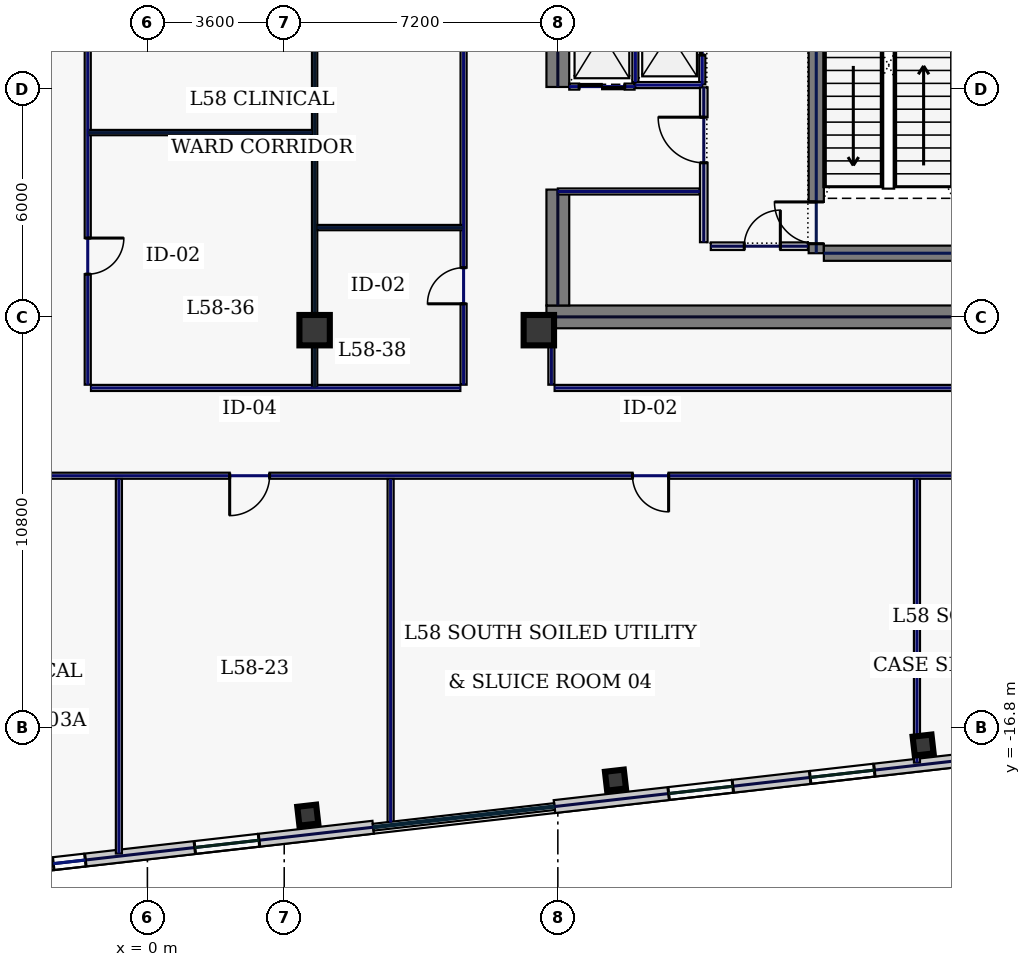
"""IFC4 building model, lengths in metres.
Left out: names, types, materials, properties, quantities, classifications, styles, units other than length and angle.
Written with IfcOpenShell. Run it as: python <this file> out.ifc"""

import sys

from ifc_helpers import new_model, si_unit, direction, frame, frame_2d, origin, origin_2d, place, context, subcontext, project, spatial, rectangle, hollow_rectangle, extrude, element, fill, save


model = new_model("IFC4")
c1 = context("Model", 3, precision=1e-05, world=origin(), true_north=direction((0.0, 1.0)))
c2 = subcontext(c1, "Body", "Model", "MODEL_VIEW")
j1 = project(units=[si_unit("LENGTHUNIT", "METRE"), si_unit("PLANEANGLEUNIT", "RADIAN")], contexts=[c1])
p1 = place(None, origin())
s1 = spatial("IfcSite", under=j1, at=p1, CompositionType="ELEMENT")
p2 = place(p1, origin())
s2 = spatial("IfcBuilding", under=s1, at=p2, CompositionType="ELEMENT")
p3 = place(p2, frame((0.0, 0.0, 251.0)))
s3 = spatial("IfcBuildingStorey", under=s2, at=p3, CompositionType="ELEMENT", Elevation=251.0)
p4 = place(p3, frame((10.5, -6.0, 0.0), z_axis=(0.0, 0.0, 1.0), x_axis=(1.0, 0.0, 0.0)))
e1 = element("IfcWall", 1, at=p4, inside=s3, PredefinedType="SHEAR", context=c2, shape_type="SweptSolid", body=[
    extrude(rectangle(XDim=11.5, YDim=0.6, at=frame_2d((5.75, 0.0))), origin(), (0.0, 0.0, 1.0), 3.74),
])
p5 = place(p3, frame((10.8, -5.7, 0.0), z_axis=(0.0, 0.0, 1.0), x_axis=(0.0, 1.0, 0.0)))
e2 = element("IfcWall", 2, at=p5, inside=s3, PredefinedType="SHEAR", context=c2, shape_type="SweptSolid", body=[
    extrude(rectangle(XDim=3.05, YDim=0.6, at=frame_2d((1.525, 0.0))), origin(), (0.0, 0.0, 1.0), 3.74),
])
p6 = place(p3, frame((10.8, 0.05, 0.0), z_axis=(0.0, 0.0, 1.0), x_axis=(0.0, 1.0, 0.0)))
e3 = element("IfcWall", 3, at=p6, inside=s3, PredefinedType="SHEAR", context=c2, shape_type="SweptSolid", body=[
    extrude(rectangle(XDim=5.65, YDim=0.6, at=frame_2d((2.825, 0.0))), origin(), (0.0, 0.0, 1.0), 3.74),
])
p7 = place(p3, frame((17.6, -4.325, 0.0), z_axis=(0.0, 0.0, 1.0), x_axis=(0.0, 1.0, 0.0)))
e4 = element("IfcWall", 4, at=p7, inside=s3, PredefinedType="SHEAR", context=c2, shape_type="SweptSolid", body=[
    extrude(rectangle(XDim=8.65, YDim=0.4, at=frame_2d((4.325, 0.0))), origin(), (0.0, 0.0, 1.0), 3.74),
])
p8 = place(p7, frame((0.25, 0.0, 0.0)))
e5 = element("IfcOpeningElement", 5, at=p8, cuts=e4, PredefinedType="OPENING", context=c2, shape_type="SweptSolid", body=[
    extrude(rectangle(XDim=1.1, YDim=2.2, at=frame_2d((0.55, 1.1))), frame((0.0, 0.21, 0.0), z_axis=(0.0, -1.0, 0.0), x_axis=(1.0, 0.0, 0.0)), (0.0, 0.0, 1.0), 0.42),
])
p9 = place(p3, frame((17.8, -4.325, 0.0), z_axis=(0.0, 0.0, 1.0), x_axis=(1.0, 0.0, 0.0)))
e6 = element("IfcWall", 6, at=p9, inside=s3, PredefinedType="SHEAR", context=c2, shape_type="SweptSolid", body=[
    extrude(rectangle(XDim=3.4, YDim=0.4, at=frame_2d((1.7, 0.0))), origin(), (0.0, 0.0, 1.0), 3.74),
])
for number, where, z_axis, x_axis in (
    (7, (10.3, -6.35, 0.0), (0.0, 0.0, 1.0), (1.0, 0.0, 0.0)),
    (8, (4.4, -6.35, 0.0), (0.0, 0.0, 1.0), (1.0, 0.0, 0.0)),
):
    element("IfcColumn", number, at=place(p3, frame(where, z_axis=z_axis, x_axis=x_axis)), inside=s3, PredefinedType="COLUMN", context=c2, shape_type="SweptSolid", body=[
        extrude(hollow_rectangle(XDim=0.8, YDim=0.8, WallThickness=0.036, at=origin_2d()), origin(), (0.0, 0.0, 1.0), 3.74),
    ])
for number, where, z_axis, x_axis in (
    (9, (4.22, -19.113, 0.0), (0.0, 0.0, 1.0), (0.994, 0.113, 0.0)),
    (10, (12.316, -18.19, 0.0), (0.0, 0.0, 1.0), (0.994, 0.113, 0.0)),
    (11, (20.412, -17.268, 0.0), (0.0, 0.0, 1.0), (0.994, 0.113, 0.0)),
):
    element("IfcColumn", number, at=place(p3, frame(where, z_axis=z_axis, x_axis=x_axis)), inside=s3, PredefinedType="COLUMN", context=c2, shape_type="SweptSolid", body=[
        extrude(hollow_rectangle(XDim=0.5, YDim=0.5, WallThickness=0.025, at=origin_2d()), origin(), (0.0, 0.0, 1.0), 3.74),
    ])
p10 = place(p3, frame((-5.482, -20.731, 0.0), z_axis=(0.0, 0.0, 1.0), x_axis=(0.993571968199, 0.113202226169, 0.0)))
e12 = element("IfcWall", 12, at=p10, inside=s3, PredefinedType="STANDARD", context=c2, shape_type="SweptSolid", body=[
    extrude(rectangle(XDim=11.497, YDim=0.34, at=frame_2d((5.749, 0.0))), origin(), (0.0, 0.0, 1.0), 3.74),
])
p11 = place(p10, frame((3.024, 0.0, 0.88)))
e13 = element("IfcOpeningElement", 13, at=p11, cuts=e12, PredefinedType="OPENING", context=c2, shape_type="SweptSolid", body=[
    extrude(rectangle(XDim=0.85, YDim=1.85, at=frame_2d((0.425, 0.925))), frame((0.0, 0.18, 0.0), z_axis=(0.0, -1.0, 0.0), x_axis=(1.0, 0.0, 0.0)), (0.0, 0.0, 1.0), 0.36),
])
p12 = place(p10, frame((6.773, 0.0, 0.88)))
e14 = element("IfcOpeningElement", 14, at=p12, cuts=e12, PredefinedType="OPENING", context=c2, shape_type="SweptSolid", body=[
    extrude(rectangle(XDim=1.7, YDim=1.95, at=frame_2d((0.85, 0.975))), frame((0.0, 0.18, 0.0), z_axis=(0.0, -1.0, 0.0), x_axis=(1.0, 0.0, 0.0)), (0.0, 0.0, 1.0), 0.36),
])
p13 = place(p3, frame((10.71, -18.886, 0.0), z_axis=(0.0, 0.0, 1.0), x_axis=(0.993572271362, 0.113199565282, 0.0)))
e15 = element("IfcWall", 15, at=p13, inside=s3, PredefinedType="STANDARD", context=c2, shape_type="SweptSolid", body=[
    extrude(rectangle(XDim=18.651, YDim=0.34, at=frame_2d((9.326, 0.0))), origin(), (0.0, 0.0, 1.0), 3.74),
])
p14 = place(p13, frame((3.024, 0.0, 0.88)))
e16 = element("IfcOpeningElement", 16, at=p14, cuts=e15, PredefinedType="OPENING", context=c2, shape_type="SweptSolid", body=[
    extrude(rectangle(XDim=1.7, YDim=1.95, at=frame_2d((0.85, 0.975))), frame((0.0, 0.18, 0.0), z_axis=(0.0, -1.0, 0.0), x_axis=(1.0, 0.0, 0.0)), (0.0, 0.0, 1.0), 0.36),
])
p15 = place(p13, frame((6.773, 0.0, 0.88)))
e17 = element("IfcOpeningElement", 17, at=p15, cuts=e15, PredefinedType="OPENING", context=c2, shape_type="SweptSolid", body=[
    extrude(rectangle(XDim=1.7, YDim=1.95, at=frame_2d((0.85, 0.975))), frame((0.0, 0.18, 0.0), z_axis=(0.0, -1.0, 0.0), x_axis=(1.0, 0.0, 0.0)), (0.0, 0.0, 1.0), 0.36),
])
p16 = place(p13, frame((11.173, 0.0, 0.88)))
e18 = element("IfcOpeningElement", 18, at=p16, cuts=e15, PredefinedType="OPENING", context=c2, shape_type="SweptSolid", body=[
    extrude(rectangle(XDim=1.7, YDim=1.95, at=frame_2d((0.85, 0.975))), frame((0.0, 0.18, 0.0), z_axis=(0.0, -1.0, 0.0), x_axis=(1.0, 0.0, 0.0)), (0.0, 0.0, 1.0), 0.36),
])
p17 = place(p13, frame((14.921, 0.0, 0.88)))
e19 = element("IfcOpeningElement", 19, at=p17, cuts=e15, PredefinedType="OPENING", context=c2, shape_type="SweptSolid", body=[
    extrude(rectangle(XDim=1.7, YDim=1.95, at=frame_2d((0.85, 0.975))), frame((0.0, 0.18, 0.0), z_axis=(0.0, -1.0, 0.0), x_axis=(1.0, 0.0, 0.0)), (0.0, 0.0, 1.0), 0.36),
])
p18 = place(p3, frame((14.6, 0.12, 0.0), z_axis=(0.0, 0.0, 1.0), x_axis=(0.0, 1.0, 0.0)))
e20 = element("IfcWall", 20, at=p18, inside=s3, PredefinedType="PARTITIONING", context=c2, shape_type="SweptSolid", body=[
    extrude(rectangle(XDim=2.74, YDim=0.16, at=frame_2d((1.37, 0.0))), origin(), (0.0, 0.0, 1.0), 3.74),
])
p19 = place(p18, frame((0.77, 0.0, 0.0)))
e21 = element("IfcOpeningElement", 21, at=p19, cuts=e20, PredefinedType="OPENING", context=c2, shape_type="SweptSolid", body=[
    extrude(rectangle(XDim=1.2, YDim=2.2, at=frame_2d((0.6, 1.1))), frame((0.0, 0.09, 0.0), z_axis=(0.0, -1.0, 0.0), x_axis=(1.0, 0.0, 0.0)), (0.0, 0.0, 1.0), 0.18),
])
p20 = place(p3, frame((12.84, 0.1, 0.0), z_axis=(0.0, 0.0, 1.0), x_axis=(1.0, 0.0, 0.0)))
e22 = element("IfcWall", 22, at=p20, inside=s3, PredefinedType="PARTITIONING", context=c2, shape_type="SweptSolid", body=[
    extrude(rectangle(XDim=1.76, YDim=0.16, at=frame_2d((0.88, 0.0))), origin(), (0.0, 0.0, 1.0), 3.74),
])
p21 = place(p3, frame((12.84, 0.18, 0.0), z_axis=(0.0, 0.0, 1.0), x_axis=(0.0, 1.0, 0.0)))
e23 = element("IfcWall", 23, at=p21, inside=s3, PredefinedType="PARTITIONING", context=c2, shape_type="SweptSolid", body=[
    extrude(rectangle(XDim=2.62, YDim=0.16, at=frame_2d((1.31, 0.0))), origin(), (0.0, 0.0, 1.0), 3.74),
])
p22 = place(p3, frame((11.1, 0.06, 0.0), z_axis=(0.0, 0.0, 1.0), x_axis=(1.0, 0.0, 0.0)))
e24 = element("IfcWall", 24, at=p22, inside=s3, PredefinedType="PARTITIONING", context=c2, shape_type="SweptSolid", body=[
    extrude(rectangle(XDim=1.72, YDim=0.16, at=frame_2d((0.86, 0.0))), origin(), (0.0, 0.0, 1.0), 3.74),
])
p23 = place(p22, frame((0.26, 0.0, 0.0)))
e25 = element("IfcOpeningElement", 25, at=p23, cuts=e24, PredefinedType="OPENING", context=c2, shape_type="SweptSolid", body=[
    extrude(rectangle(XDim=1.2, YDim=2.2, at=frame_2d((0.6, 1.1))), frame((0.0, 0.09, 0.0), z_axis=(0.0, -1.0, 0.0), x_axis=(1.0, 0.0, 0.0)), (0.0, 0.0, 1.0), 0.18),
])
p24 = place(p3, frame((14.825, -4.14, 0.0), z_axis=(0.0, 0.0, 1.0), x_axis=(1.0, 0.0, 0.0)))
e26 = element("IfcWall", 26, at=p24, inside=s3, PredefinedType="SOLIDWALL", context=c2, shape_type="SweptSolid", body=[
    extrude(rectangle(XDim=2.555, YDim=0.2, at=frame_2d((1.277, 0.0))), origin(), (0.0, 0.0, 1.0), 3.74),
])
p25 = place(p24, frame((0.88, 0.0, 0.0)))
e27 = element("IfcOpeningElement", 27, at=p25, cuts=e26, PredefinedType="OPENING", context=c2, shape_type="SweptSolid", body=[
    extrude(rectangle(XDim=0.95, YDim=2.2, at=frame_2d((0.475, 1.1))), frame((0.0, 0.11, 0.0), z_axis=(0.0, -1.0, 0.0), x_axis=(1.0, 0.0, 0.0)), (0.0, 0.0, 1.0), 0.22),
])
p26 = place(p3, frame((10.8, -2.7, 0.0), z_axis=(0.0, 0.0, 1.0), x_axis=(1.0, 0.0, 0.0)))
e28 = element("IfcWall", 28, at=p26, inside=s3, PredefinedType="PARTITIONING", context=c2, shape_type="SweptSolid", body=[
    extrude(rectangle(XDim=3.735, YDim=0.16, at=frame_2d((1.867, 0.0))), origin(), (0.0, 0.0, 1.0), 3.74),
])
p27 = place(p3, frame((14.64, -4.035, 0.0), z_axis=(0.0, 0.0, 1.0), x_axis=(0.0, 1.0, 0.0)))
e29 = element("IfcWall", 29, at=p27, inside=s3, PredefinedType="SOLIDWALL", context=c2, shape_type="SweptSolid", body=[
    extrude(rectangle(XDim=4.075, YDim=0.2, at=frame_2d((2.038, 0.0))), origin(), (0.0, 0.0, 1.0), 3.74),
])
p28 = place(p27, frame((2.09, 0.0, 0.0)))
e30 = element("IfcOpeningElement", 30, at=p28, cuts=e29, PredefinedType="OPENING", context=c2, shape_type="SweptSolid", body=[
    extrude(rectangle(XDim=1.2, YDim=2.2, at=frame_2d((0.6, 1.1))), frame((0.0, 0.11, 0.0), z_axis=(0.0, -1.0, 0.0), x_axis=(1.0, 0.0, 0.0)), (0.0, 0.0, 1.0), 0.22),
])
p29 = place(p3, frame((24.815, -10.18, 0.0), z_axis=(0.0, 0.0, 1.0), x_axis=(-1.0, 0.0, 0.0)))
e31 = element("IfcWall", 31, at=p29, inside=s3, PredefinedType="PARTITIONING", context=c2, shape_type="SweptSolid", body=[
    extrude(rectangle(XDim=37.35, YDim=0.16, at=frame_2d((18.675, 0.0))), origin(), (0.0, 0.0, 1.0), 3.74),
])
p30 = place(p29, frame((29.025, 0.0, 0.0)))
e32 = element("IfcOpeningElement", 32, at=p30, cuts=e31, PredefinedType="OPENING", context=c2, shape_type="SweptSolid", body=[
    extrude(rectangle(XDim=1.3, YDim=2.2, at=frame_2d((0.65, 1.1))), frame((0.0, 0.09, 0.0), z_axis=(0.0, -1.0, 0.0), x_axis=(1.0, 0.0, 0.0)), (0.0, 0.0, 1.0), 0.18),
])
p31 = place(p29, frame((21.6, 0.0, 0.0)))
e33 = element("IfcOpeningElement", 33, at=p31, cuts=e31, PredefinedType="OPENING", context=c2, shape_type="SweptSolid", body=[
    extrude(rectangle(XDim=1.05, YDim=2.2, at=frame_2d((0.525, 1.1))), frame((0.0, 0.09, 0.0), z_axis=(0.0, -1.0, 0.0), x_axis=(1.0, 0.0, 0.0)), (0.0, 0.0, 1.0), 0.18),
])
p32 = place(p29, frame((11.1, 0.0, 0.0)))
e34 = element("IfcOpeningElement", 34, at=p32, cuts=e31, PredefinedType="OPENING", context=c2, shape_type="SweptSolid", body=[
    extrude(rectangle(XDim=0.95, YDim=2.2, at=frame_2d((0.475, 1.1))), frame((0.0, 0.09, 0.0), z_axis=(0.0, -1.0, 0.0), x_axis=(1.0, 0.0, 0.0)), (0.0, 0.0, 1.0), 0.18),
])
p33 = place(p29, frame((2.044, 0.0, 0.0)))
e35 = element("IfcOpeningElement", 35, at=p33, cuts=e31, PredefinedType="OPENING", context=c2, shape_type="SweptSolid", body=[
    extrude(rectangle(XDim=0.95, YDim=2.2, at=frame_2d((0.475, 1.1))), frame((0.0, 0.09, 0.0), z_axis=(0.0, -1.0, 0.0), x_axis=(1.0, 0.0, 0.0)), (0.0, 0.0, 1.0), 0.18),
])
p34 = place(p3, frame((10.63, -6.42, 0.0), z_axis=(0.0, 0.0, 1.0), x_axis=(0.0, -1.0, 0.0)))
e36 = element("IfcWall", 36, at=p34, inside=s3, PredefinedType="PARTITIONING", context=c2, shape_type="SweptSolid", body=[
    extrude(rectangle(XDim=1.365, YDim=0.16, at=frame_2d((0.683, 0.0))), origin(), (0.0, 0.0, 1.0), 3.285),
])
p35 = place(p3, frame((10.715, -7.87, 0.0), z_axis=(0.0, 0.0, 1.0), x_axis=(1.0, 0.0, 0.0)))
e37 = element("IfcWall", 37, at=p35, inside=s3, PredefinedType="PARTITIONING", context=c2, shape_type="SweptSolid", body=[
    extrude(rectangle(XDim=11.87, YDim=0.16, at=frame_2d((5.935, 0.0))), origin(), (0.0, 0.0, 1.0), 3.74),
])
p36 = place(p3, frame((-1.57, 7.885, 0.0), z_axis=(0.0, 0.0, 1.0), x_axis=(0.0, -1.0, 0.0)))
e38 = element("IfcWall", 38, at=p36, inside=s3, PredefinedType="PARTITIONING", context=c2, shape_type="SweptSolid", body=[
    extrude(rectangle(XDim=15.67, YDim=0.16, at=frame_2d((7.835, 0.0))), origin(), (0.0, 0.0, 1.0), 3.74),
])
p37 = place(p36, frame((11.811, 0.0, 0.0)))
e39 = element("IfcOpeningElement", 39, at=p37, cuts=e38, PredefinedType="OPENING", context=c2, shape_type="SweptSolid", body=[
    extrude(rectangle(XDim=0.95, YDim=2.2, at=frame_2d((0.475, 1.1))), frame((0.0, 0.09, 0.0), z_axis=(0.0, -1.0, 0.0), x_axis=(1.0, 0.0, 0.0)), (0.0, 0.0, 1.0), 0.18),
])
p38 = place(p36, frame((4.279, 0.0, 0.0)))
e40 = element("IfcOpeningElement", 40, at=p38, cuts=e38, PredefinedType="OPENING", context=c2, shape_type="SweptSolid", body=[
    extrude(rectangle(XDim=0.95, YDim=2.2, at=frame_2d((0.475, 1.1))), frame((0.0, 0.09, 0.0), z_axis=(0.0, -1.0, 0.0), x_axis=(1.0, 0.0, 0.0)), (0.0, 0.0, 1.0), 0.18),
])
p39 = place(p3, frame((-1.485, -7.87, 0.0), z_axis=(0.0, 0.0, 1.0), x_axis=(1.0, 0.0, 0.0)))
e41 = element("IfcWall", 41, at=p39, inside=s3, PredefinedType="PARTITIONING", context=c2, shape_type="SweptSolid", body=[
    extrude(rectangle(XDim=9.72, YDim=0.16, at=frame_2d((4.86, 0.0))), origin(), (0.0, 0.0, 1.0), 3.74),
])
p40 = place(p3, frame((8.32, -7.785, 0.0), z_axis=(0.0, 0.0, 1.0), x_axis=(0.0, 1.0, 0.0)))
e42 = element("IfcWall", 42, at=p40, inside=s3, PredefinedType="PARTITIONING", context=c2, shape_type="SweptSolid", body=[
    extrude(rectangle(XDim=15.67, YDim=0.16, at=frame_2d((7.835, 0.0))), origin(), (0.0, 0.0, 1.0), 3.74),
])
p41 = place(p40, frame((2.129, 0.0, 0.0)))
e43 = element("IfcOpeningElement", 43, at=p41, cuts=e42, PredefinedType="OPENING", context=c2, shape_type="SweptSolid", body=[
    extrude(rectangle(XDim=0.95, YDim=2.2, at=frame_2d((0.475, 1.1))), frame((0.0, 0.09, 0.0), z_axis=(0.0, -1.0, 0.0), x_axis=(1.0, 0.0, 0.0)), (0.0, 0.0, 1.0), 0.18),
])
p42 = place(p40, frame((9.361, 0.0, 0.0)))
e44 = element("IfcOpeningElement", 44, at=p42, cuts=e42, PredefinedType="OPENING", context=c2, shape_type="SweptSolid", body=[
    extrude(rectangle(XDim=0.95, YDim=2.2, at=frame_2d((0.475, 1.1))), frame((0.0, 0.09, 0.0), z_axis=(0.0, -1.0, 0.0), x_axis=(1.0, 0.0, 0.0)), (0.0, 0.0, 1.0), 0.18),
])
p43 = place(p3, frame((6.4, -19.307, 0.0), z_axis=(0.0, 0.0, 1.0), x_axis=(0.0, 1.0, 0.0)))
e45 = element("IfcWall", 45, at=p43, inside=s3, PredefinedType="PARTITIONING", context=c2, shape_type="SweptSolid", body=[
    extrude(rectangle(XDim=9.042, YDim=0.16, at=frame_2d((4.521, 0.0))), origin(), (0.0, 0.0, 1.0), 3.74),
])
p44 = place(p3, frame((20.25, -17.729, 0.0), z_axis=(0.0, 0.0, 1.0), x_axis=(0.0, 1.0, 0.0)))
e46 = element("IfcWall", 46, at=p44, inside=s3, PredefinedType="PARTITIONING", context=c2, shape_type="SweptSolid", body=[
    extrude(rectangle(XDim=7.464, YDim=0.16, at=frame_2d((3.732, 0.0))), origin(), (0.0, 0.0, 1.0), 3.74),
])
p45 = place(p3, frame((-0.75, -20.122, 0.0), z_axis=(0.0, 0.0, 1.0), x_axis=(0.0, 1.0, 0.0)))
e47 = element("IfcWall", 47, at=p45, inside=s3, PredefinedType="PARTITIONING", context=c2, shape_type="SweptSolid", body=[
    extrude(rectangle(XDim=9.857, YDim=0.16, at=frame_2d((4.928, 0.0))), origin(), (0.0, 0.0, 1.0), 3.74),
])
p46 = place(p3, frame((4.4, -7.865, 0.0), z_axis=(0.0, 0.0, 1.0), x_axis=(0.0, 1.0, 0.0)))
e48 = element("IfcWall", 48, at=p46, inside=s3, PredefinedType="PARTITIONING", context=c2, shape_type="SweptSolid", body=[
    extrude(rectangle(XDim=15.83, YDim=0.14, at=frame_2d((7.915, 0.0))), origin(), (0.0, 0.0, 1.0), 3.035),
])
p47 = place(p3, frame((-1.565, -1.15, 0.0), z_axis=(0.0, 0.0, 1.0), x_axis=(1.0, 0.0, 0.0)))
e49 = element("IfcWall", 49, at=p47, inside=s3, PredefinedType="PARTITIONING", context=c2, shape_type="SweptSolid", body=[
    extrude(rectangle(XDim=5.89, YDim=0.14, at=frame_2d((2.945, 0.0))), origin(), (0.0, 0.0, 1.0), 3.74),
])
p48 = place(p3, frame((4.475, -3.65, 0.0), z_axis=(0.0, 0.0, 1.0), x_axis=(1.0, 0.0, 0.0)))
e50 = element("IfcWall", 50, at=p48, inside=s3, PredefinedType="PARTITIONING", context=c2, shape_type="SweptSolid", body=[
    extrude(rectangle(XDim=3.84, YDim=0.14, at=frame_2d((1.92, 0.0))), origin(), (0.0, 0.0, 1.0), 3.74),
])
p49 = place(p11, origin())
e51 = element("IfcWindow", 51, at=p49, inside=s3, PartitioningType="SINGLE_PANEL", PredefinedType="WINDOW", context=c2, shape_type="SweptSolid", body=[
    extrude(rectangle(XDim=0.85, YDim=1.85, at=frame_2d((0.425, 0.925))), frame((0.0, 0.03, 0.0), z_axis=(0.0, -1.0, 0.0), x_axis=(1.0, 0.0, 0.0)), (0.0, 0.0, 1.0), 0.06),
])
fill(e13, e51)
p50 = place(p12, origin())
e52 = element("IfcWindow", 52, at=p50, inside=s3, PartitioningType="SINGLE_PANEL", PredefinedType="WINDOW", context=c2, shape_type="SweptSolid", body=[
    extrude(rectangle(XDim=1.7, YDim=1.95, at=frame_2d((0.85, 0.975))), frame((0.0, 0.03, 0.0), z_axis=(0.0, -1.0, 0.0), x_axis=(1.0, 0.0, 0.0)), (0.0, 0.0, 1.0), 0.06),
])
fill(e14, e52)
p51 = place(p14, origin())
e53 = element("IfcWindow", 53, at=p51, inside=s3, PartitioningType="SINGLE_PANEL", PredefinedType="WINDOW", context=c2, shape_type="SweptSolid", body=[
    extrude(rectangle(XDim=1.7, YDim=1.95, at=frame_2d((0.85, 0.975))), frame((0.0, 0.03, 0.0), z_axis=(0.0, -1.0, 0.0), x_axis=(1.0, 0.0, 0.0)), (0.0, 0.0, 1.0), 0.06),
])
fill(e16, e53)
p52 = place(p15, origin())
e54 = element("IfcWindow", 54, at=p52, inside=s3, PartitioningType="SINGLE_PANEL", PredefinedType="WINDOW", context=c2, shape_type="SweptSolid", body=[
    extrude(rectangle(XDim=1.7, YDim=1.95, at=frame_2d((0.85, 0.975))), frame((0.0, 0.03, 0.0), z_axis=(0.0, -1.0, 0.0), x_axis=(1.0, 0.0, 0.0)), (0.0, 0.0, 1.0), 0.06),
])
fill(e17, e54)
p53 = place(p8, origin())
e55 = element("IfcDoor", 55, at=p53, inside=s3, OperationType="SINGLE_SWING_RIGHT", PredefinedType="DOOR", context=c2, shape_type="SweptSolid", body=[
    extrude(rectangle(XDim=1.1, YDim=2.2, at=frame_2d((0.55, 1.1))), frame((0.0, 0.025, 0.0), z_axis=(0.0, -1.0, 0.0), x_axis=(1.0, 0.0, 0.0)), (0.0, 0.0, 1.0), 0.05),
])
fill(e5, e55)
p54 = place(p19, origin())
e56 = element("IfcDoor", 56, at=p54, inside=s3, OperationType="SLIDING_TO_LEFT", PredefinedType="DOOR", context=c2, shape_type="SweptSolid", body=[
    extrude(rectangle(XDim=1.2, YDim=2.2, at=frame_2d((0.6, 1.1))), frame((0.0, 0.025, 0.0), z_axis=(0.0, -1.0, 0.0), x_axis=(1.0, 0.0, 0.0)), (0.0, 0.0, 1.0), 0.05),
])
fill(e21, e56)
p55 = place(p23, origin())
e57 = element("IfcDoor", 57, at=p55, inside=s3, OperationType="SLIDING_TO_LEFT", PredefinedType="DOOR", context=c2, shape_type="SweptSolid", body=[
    extrude(rectangle(XDim=1.2, YDim=2.2, at=frame_2d((0.6, 1.1))), frame((0.0, 0.025, 0.0), z_axis=(0.0, -1.0, 0.0), x_axis=(1.0, 0.0, 0.0)), (0.0, 0.0, 1.0), 0.05),
])
fill(e25, e57)
p56 = place(p25, origin())
e58 = element("IfcDoor", 58, at=p56, inside=s3, OperationType="SINGLE_SWING_RIGHT", PredefinedType="DOOR", context=c2, shape_type="SweptSolid", body=[
    extrude(rectangle(XDim=0.95, YDim=2.2, at=frame_2d((0.475, 1.1))), frame((0.0, 0.025, 0.0), z_axis=(0.0, -1.0, 0.0), x_axis=(1.0, 0.0, 0.0)), (0.0, 0.0, 1.0), 0.05),
])
fill(e27, e58)
p57 = place(p28, origin())
e59 = element("IfcDoor", 59, at=p57, inside=s3, OperationType="SINGLE_SWING_RIGHT", PredefinedType="DOOR", context=c2, shape_type="SweptSolid", body=[
    extrude(rectangle(XDim=1.2, YDim=2.2, at=frame_2d((0.6, 1.1))), frame((0.0, 0.025, 0.0), z_axis=(0.0, -1.0, 0.0), x_axis=(1.0, 0.0, 0.0)), (0.0, 0.0, 1.0), 0.05),
])
fill(e30, e59)
p58 = place(p31, origin())
e60 = element("IfcDoor", 60, at=p58, inside=s3, OperationType="SINGLE_SWING_RIGHT", PredefinedType="DOOR", context=c2, shape_type="SweptSolid", body=[
    extrude(rectangle(XDim=1.05, YDim=2.2, at=frame_2d((0.525, 1.1))), frame((0.0, 0.025, 0.0), z_axis=(0.0, -1.0, 0.0), x_axis=(1.0, 0.0, 0.0)), (0.0, 0.0, 1.0), 0.05),
])
fill(e33, e60)
p59 = place(p32, origin())
e61 = element("IfcDoor", 61, at=p59, inside=s3, OperationType="SINGLE_SWING_LEFT", PredefinedType="DOOR", context=c2, shape_type="SweptSolid", body=[
    extrude(rectangle(XDim=0.95, YDim=2.2, at=frame_2d((0.475, 1.1))), frame((0.0, 0.025, 0.0), z_axis=(0.0, -1.0, 0.0), x_axis=(1.0, 0.0, 0.0)), (0.0, 0.0, 1.0), 0.05),
])
fill(e34, e61)
p60 = place(p37, origin())
e62 = element("IfcDoor", 62, at=p60, inside=s3, OperationType="SINGLE_SWING_LEFT", PredefinedType="DOOR", context=c2, shape_type="SweptSolid", body=[
    extrude(rectangle(XDim=0.95, YDim=2.2, at=frame_2d((0.475, 1.1))), frame((0.0, 0.025, 0.0), z_axis=(0.0, -1.0, 0.0), x_axis=(1.0, 0.0, 0.0)), (0.0, 0.0, 1.0), 0.05),
])
fill(e39, e62)
p61 = place(p41, origin())
e63 = element("IfcDoor", 63, at=p61, inside=s3, OperationType="SINGLE_SWING_LEFT", PredefinedType="DOOR", context=c2, shape_type="SweptSolid", body=[
    extrude(rectangle(XDim=0.95, YDim=2.2, at=frame_2d((0.475, 1.1))), frame((0.0, 0.025, 0.0), z_axis=(0.0, -1.0, 0.0), x_axis=(1.0, 0.0, 0.0)), (0.0, 0.0, 1.0), 0.05),
])
fill(e43, e63)
save(model, sys.argv[1])
